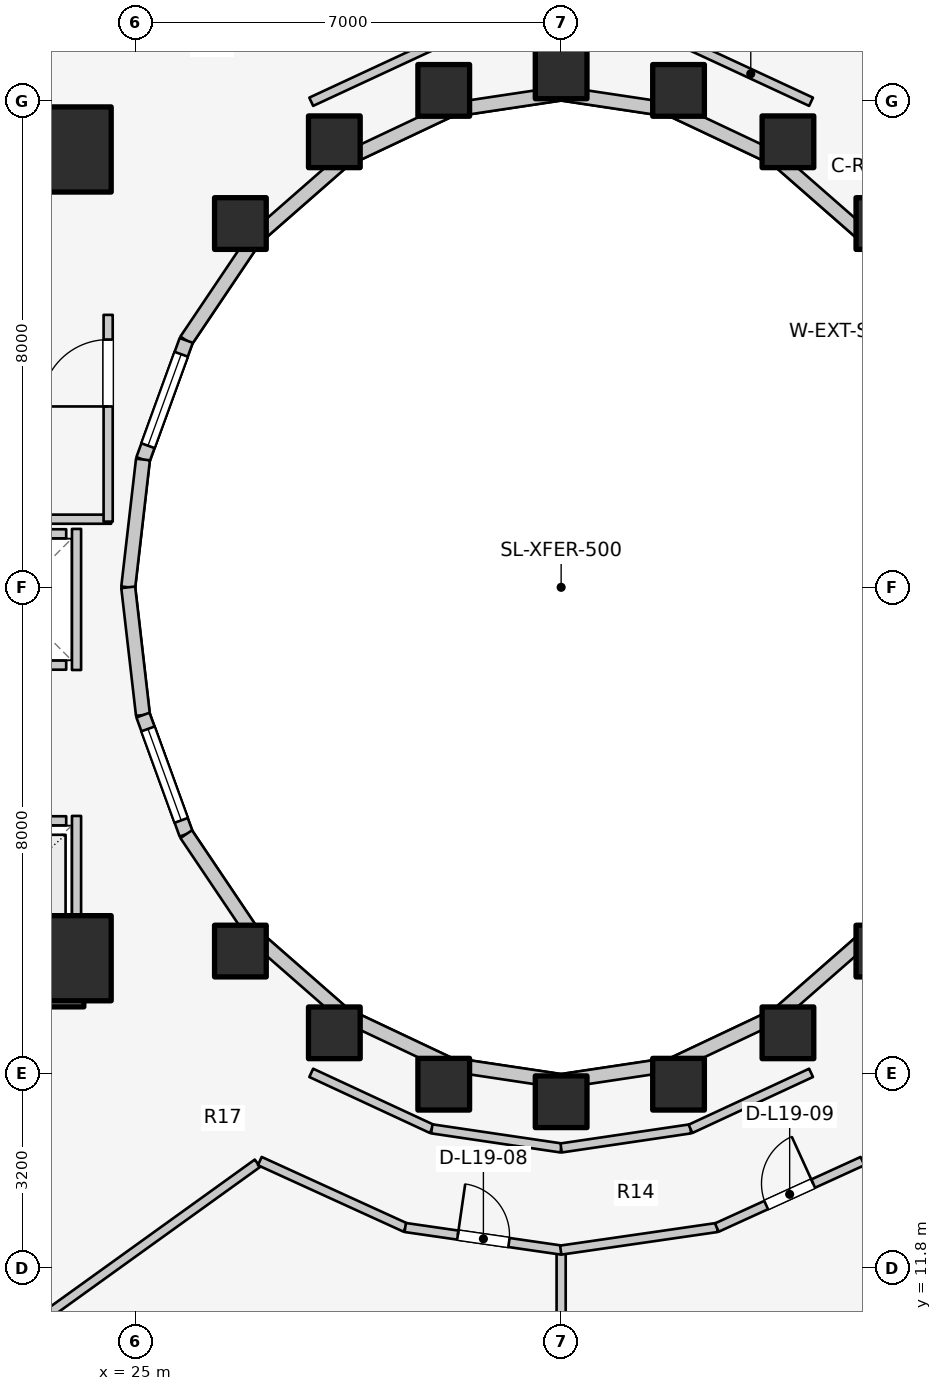
"""IFC4 building model, lengths in metres.
Left out: names, types, materials, properties, quantities, classifications, styles, units other than length and angle.
Written with IfcOpenShell. Run it as: python <this file> out.ifc"""

import sys

from ifc_helpers import new_model, si_unit, direction, frame, frame_2d, origin, origin_2d, place, context, subcontext, project, spatial, rectangle, extrude, element, fill, save


model = new_model("IFC4")
c1 = context("Model", 3, precision=1e-05, world=origin(), true_north=direction((0.0, 1.0)))
c2 = subcontext(c1, "Body", "Model", "MODEL_VIEW")
j1 = project(units=[si_unit("LENGTHUNIT", "METRE"), si_unit("PLANEANGLEUNIT", "RADIAN")], contexts=[c1])
p1 = place(None, origin())
s1 = spatial("IfcSite", under=j1, at=p1, CompositionType="ELEMENT")
p2 = place(p1, origin())
s2 = spatial("IfcBuilding", under=s1, at=p2, CompositionType="ELEMENT")
p3 = place(p2, frame((0.0, 0.0, 64.8)))
s3 = spatial("IfcBuildingStorey", under=s2, at=p3, CompositionType="ELEMENT", Elevation=64.8)
for number, where, z_axis, x_axis in (
    (1, (19.65, 16.55, 0.0), (0.0, 0.0, 1.0), (1.0, 0.0, 0.0)),
    (2, (19.65, 30.35, 0.0), (0.0, 0.0, 1.0), (1.0, 0.0, 0.0)),
):
    element("IfcWall", number, at=place(p3, frame(where, z_axis=z_axis, x_axis=x_axis)), inside=s3, PredefinedType="SHEAR", context=c2, shape_type="SweptSolid", body=[
        extrude(rectangle(XDim=4.5, YDim=0.9, at=frame_2d((2.25, 0.0))), origin(), (0.0, 0.0, 1.0), 4.2),
    ])
for number, where, z_axis, x_axis in (
    (3, (23.9, 16.9, 0.0), (0.0, 0.0, 1.0), (1.0, 0.0, 0.0)),
    (4, (23.9, 30.2, 0.0), (0.0, 0.0, 1.0), (1.0, 0.0, 0.0)),
):
    element("IfcColumn", number, at=place(p3, frame(where, z_axis=z_axis, x_axis=x_axis)), inside=s3, PredefinedType="COLUMN", context=c2, shape_type="SweptSolid", body=[
        extrude(rectangle(XDim=1.4, YDim=1.4, at=origin_2d()), origin(), (0.0, 0.0, 1.0), 4.2),
    ])
for number, where, z_axis, x_axis in (
    (5, (37.275, 28.982, 0.0), (0.0, 0.0, 1.0), (1.0, 0.0, 0.0)),
    (6, (35.73, 30.327, 0.0), (0.0, 0.0, 1.0), (1.0, 0.0, 0.0)),
    (7, (33.931, 31.172, 0.0), (0.0, 0.0, 1.0), (1.0, 0.0, 0.0)),
    (8, (32.0, 31.46, 0.0), (0.0, 0.0, 1.0), (1.0, 0.0, 0.0)),
    (9, (30.069, 31.172, 0.0), (0.0, 0.0, 1.0), (1.0, 0.0, 0.0)),
    (10, (28.27, 30.327, 0.0), (0.0, 0.0, 1.0), (1.0, 0.0, 0.0)),
    (11, (26.725, 28.982, 0.0), (0.0, 0.0, 1.0), (1.0, 0.0, 0.0)),
    (12, (26.725, 17.018, 0.0), (0.0, 0.0, 1.0), (1.0, 0.0, 0.0)),
    (13, (28.27, 15.673, 0.0), (0.0, 0.0, 1.0), (1.0, 0.0, 0.0)),
    (14, (30.069, 14.828, 0.0), (0.0, 0.0, 1.0), (1.0, 0.0, 0.0)),
    (15, (32.0, 14.54, 0.0), (0.0, 0.0, 1.0), (1.0, 0.0, 0.0)),
    (16, (33.931, 14.828, 0.0), (0.0, 0.0, 1.0), (1.0, 0.0, 0.0)),
    (17, (35.73, 15.673, 0.0), (0.0, 0.0, 1.0), (1.0, 0.0, 0.0)),
    (18, (37.275, 17.018, 0.0), (0.0, 0.0, 1.0), (1.0, 0.0, 0.0)),
):
    element("IfcColumn", number, at=place(p3, frame(where, z_axis=z_axis, x_axis=x_axis)), inside=s3, PredefinedType="COLUMN", context=c2, shape_type="SweptSolid", body=[
        extrude(rectangle(XDim=0.85, YDim=0.85, at=origin_2d()), origin(), (0.0, 0.0, 1.0), 4.2),
    ])
p4 = place(p3, frame((38.166, 27.06, 0.0), z_axis=(0.0, 0.0, 1.0), x_axis=(-0.558197800898, 0.829707909492, 0.0)))
e19 = element("IfcWall", 19, at=p4, inside=s3, PredefinedType="STANDARD", context=c2, shape_type="SweptSolid", body=[
    extrude(rectangle(XDim=2.027, YDim=0.23, at=frame_2d((1.013, 0.0))), origin(), (0.0, 0.0, 1.0), 2.32),
])
p5 = place(p3, frame((37.035, 28.742, 0.0), z_axis=(0.0, 0.0, 1.0), x_axis=(-0.752576694707, 0.658504607869, 0.0)))
e20 = element("IfcWall", 20, at=p5, inside=s3, PredefinedType="STANDARD", context=c2, shape_type="SweptSolid", body=[
    extrude(rectangle(XDim=1.959, YDim=0.23, at=frame_2d((0.98, 0.0))), origin(), (0.0, 0.0, 1.0), 2.32),
])
p6 = place(p3, frame((35.56, 30.032, 0.0), z_axis=(0.0, 0.0, 1.0), x_axis=(-0.904179699603, 0.427152280606, 0.0)))
e21 = element("IfcWall", 21, at=p6, inside=s3, PredefinedType="STANDARD", context=c2, shape_type="SweptSolid", body=[
    extrude(rectangle(XDim=1.899, YDim=0.23, at=frame_2d((0.95, 0.0))), origin(), (0.0, 0.0, 1.0), 2.32),
])
for number, where, z_axis, x_axis in (
    (22, (33.843, 30.843, 0.0), (0.0, 0.0, 1.0), (-0.989, 0.149, 0.0)),
    (23, (32.0, 31.12, 0.0), (0.0, 0.0, 1.0), (-0.989, -0.149, 0.0)),
):
    element("IfcWall", number, at=place(p3, frame(where, z_axis=z_axis, x_axis=x_axis)), inside=s3, PredefinedType="STANDARD", context=c2, shape_type="SweptSolid", body=[
        extrude(rectangle(XDim=1.864, YDim=0.23, at=frame_2d((0.932, 0.0))), origin(), (0.0, 0.0, 1.0), 2.32),
    ])
p7 = place(p3, frame((30.157, 30.843, 0.0), z_axis=(0.0, 0.0, 1.0), x_axis=(-0.904179699603, -0.427152280606, 0.0)))
e24 = element("IfcWall", 24, at=p7, inside=s3, PredefinedType="STANDARD", context=c2, shape_type="SweptSolid", body=[
    extrude(rectangle(XDim=1.899, YDim=0.23, at=frame_2d((0.95, 0.0))), origin(), (0.0, 0.0, 1.0), 2.32),
])
p8 = place(p3, frame((28.44, 30.032, 0.0), z_axis=(0.0, 0.0, 1.0), x_axis=(-0.752576694707, -0.658504607869, 0.0)))
e25 = element("IfcWall", 25, at=p8, inside=s3, PredefinedType="STANDARD", context=c2, shape_type="SweptSolid", body=[
    extrude(rectangle(XDim=1.959, YDim=0.23, at=frame_2d((0.98, 0.0))), origin(), (0.0, 0.0, 1.0), 2.32),
])
p9 = place(p3, frame((26.965, 28.742, 0.0), z_axis=(0.0, 0.0, 1.0), x_axis=(-0.558197800898, -0.829707909492, 0.0)))
e26 = element("IfcWall", 26, at=p9, inside=s3, PredefinedType="STANDARD", context=c2, shape_type="SweptSolid", body=[
    extrude(rectangle(XDim=2.027, YDim=0.23, at=frame_2d((1.013, 0.0))), origin(), (0.0, 0.0, 1.0), 2.32),
])
p10 = place(p3, frame((25.834, 27.06, 0.0), z_axis=(0.0, 0.0, 1.0), x_axis=(-0.341423187295, -0.93990968033, 0.0)))
e27 = element("IfcWall", 27, at=p10, inside=s3, PredefinedType="STANDARD", context=c2, shape_type="SweptSolid", body=[
    extrude(rectangle(XDim=2.084, YDim=0.23, at=frame_2d((1.042, 0.0))), origin(), (0.0, 0.0, 1.0), 2.8),
])
p11 = place(p10, frame((0.242, 0.0, 0.85)))
e28 = element("IfcOpeningElement", 28, at=p11, cuts=e27, PredefinedType="OPENING", context=c2, shape_type="SweptSolid", body=[
    extrude(rectangle(XDim=1.6, YDim=1.65, at=frame_2d((0.8, 0.825))), frame((0.0, 0.125, 0.0), z_axis=(0.0, -1.0, 0.0), x_axis=(1.0, 0.0, 0.0)), (0.0, 0.0, 1.0), 0.25),
])
for number, where, z_axis, x_axis in (
    (29, (25.123, 25.102, 0.0), (0.0, 0.0, 1.0), (-0.115, -0.993, 0.0)),
    (30, (24.88, 23.0, 0.0), (0.0, 0.0, 1.0), (0.115, -0.993, 0.0)),
):
    element("IfcWall", number, at=place(p3, frame(where, z_axis=z_axis, x_axis=x_axis)), inside=s3, PredefinedType="STANDARD", context=c2, shape_type="SweptSolid", body=[
        extrude(rectangle(XDim=2.115, YDim=0.23, at=frame_2d((1.058, 0.0))), origin(), (0.0, 0.0, 1.0), 2.8),
    ])
p12 = place(p3, frame((25.123, 20.898, 0.0), z_axis=(0.0, 0.0, 1.0), x_axis=(0.341423187295, -0.93990968033, 0.0)))
e31 = element("IfcWall", 31, at=p12, inside=s3, PredefinedType="STANDARD", context=c2, shape_type="SweptSolid", body=[
    extrude(rectangle(XDim=2.084, YDim=0.23, at=frame_2d((1.042, 0.0))), origin(), (0.0, 0.0, 1.0), 2.8),
])
p13 = place(p12, frame((0.242, 0.0, 0.85)))
e32 = element("IfcOpeningElement", 32, at=p13, cuts=e31, PredefinedType="OPENING", context=c2, shape_type="SweptSolid", body=[
    extrude(rectangle(XDim=1.6, YDim=1.65, at=frame_2d((0.8, 0.825))), frame((0.0, 0.125, 0.0), z_axis=(0.0, -1.0, 0.0), x_axis=(1.0, 0.0, 0.0)), (0.0, 0.0, 1.0), 0.25),
])
p14 = place(p3, frame((25.834, 18.94, 0.0), z_axis=(0.0, 0.0, 1.0), x_axis=(0.558197800898, -0.829707909492, 0.0)))
e33 = element("IfcWall", 33, at=p14, inside=s3, PredefinedType="STANDARD", context=c2, shape_type="SweptSolid", body=[
    extrude(rectangle(XDim=2.027, YDim=0.23, at=frame_2d((1.013, 0.0))), origin(), (0.0, 0.0, 1.0), 2.32),
])
p15 = place(p3, frame((26.965, 17.258, 0.0), z_axis=(0.0, 0.0, 1.0), x_axis=(0.752576694707, -0.658504607869, 0.0)))
e34 = element("IfcWall", 34, at=p15, inside=s3, PredefinedType="STANDARD", context=c2, shape_type="SweptSolid", body=[
    extrude(rectangle(XDim=1.959, YDim=0.23, at=frame_2d((0.98, 0.0))), origin(), (0.0, 0.0, 1.0), 2.32),
])
p16 = place(p3, frame((28.44, 15.968, 0.0), z_axis=(0.0, 0.0, 1.0), x_axis=(0.904179699603, -0.427152280606, 0.0)))
e35 = element("IfcWall", 35, at=p16, inside=s3, PredefinedType="STANDARD", context=c2, shape_type="SweptSolid", body=[
    extrude(rectangle(XDim=1.899, YDim=0.23, at=frame_2d((0.95, 0.0))), origin(), (0.0, 0.0, 1.0), 2.32),
])
for number, where, z_axis, x_axis in (
    (36, (30.157, 15.157, 0.0), (0.0, 0.0, 1.0), (0.989, -0.149, 0.0)),
    (37, (32.0, 14.88, 0.0), (0.0, 0.0, 1.0), (0.989, 0.149, 0.0)),
):
    element("IfcWall", number, at=place(p3, frame(where, z_axis=z_axis, x_axis=x_axis)), inside=s3, PredefinedType="STANDARD", context=c2, shape_type="SweptSolid", body=[
        extrude(rectangle(XDim=1.864, YDim=0.23, at=frame_2d((0.932, 0.0))), origin(), (0.0, 0.0, 1.0), 2.32),
    ])
p17 = place(p3, frame((33.843, 15.157, 0.0), z_axis=(0.0, 0.0, 1.0), x_axis=(0.904179699603, 0.427152280606, 0.0)))
e38 = element("IfcWall", 38, at=p17, inside=s3, PredefinedType="STANDARD", context=c2, shape_type="SweptSolid", body=[
    extrude(rectangle(XDim=1.899, YDim=0.23, at=frame_2d((0.95, 0.0))), origin(), (0.0, 0.0, 1.0), 2.32),
])
p18 = place(p3, frame((35.56, 15.968, 0.0), z_axis=(0.0, 0.0, 1.0), x_axis=(0.752576694707, 0.658504607869, 0.0)))
e39 = element("IfcWall", 39, at=p18, inside=s3, PredefinedType="STANDARD", context=c2, shape_type="SweptSolid", body=[
    extrude(rectangle(XDim=1.959, YDim=0.23, at=frame_2d((0.98, 0.0))), origin(), (0.0, 0.0, 1.0), 2.32),
])
p19 = place(p3, frame((37.035, 17.258, 0.0), z_axis=(0.0, 0.0, 1.0), x_axis=(0.558197800898, 0.829707909492, 0.0)))
e40 = element("IfcWall", 40, at=p19, inside=s3, PredefinedType="STANDARD", context=c2, shape_type="SweptSolid", body=[
    extrude(rectangle(XDim=2.027, YDim=0.23, at=frame_2d((1.013, 0.0))), origin(), (0.0, 0.0, 1.0), 2.32),
])
p20 = place(p3, frame((22.04, 19.16, 0.0), z_axis=(0.0, 0.0, 1.0), x_axis=(1.0, 0.0, 0.0)))
e41 = element("IfcWall", 41, at=p20, inside=s3, PredefinedType="SOLIDWALL", context=c2, shape_type="SweptSolid", body=[
    extrude(rectangle(XDim=1.82, YDim=0.15, at=frame_2d((0.91, 0.0))), origin(), (0.0, 0.0, 1.0), 3.22),
])
p21 = place(p20, frame((0.36, 0.0, 0.0)))
e42 = element("IfcOpeningElement", 42, at=p21, cuts=e41, PredefinedType="OPENING", context=c2, shape_type="SweptSolid", body=[
    extrude(rectangle(XDim=1.1, YDim=2.1, at=frame_2d((0.55, 1.05))), frame((0.0, 0.085, 0.0), z_axis=(0.0, -1.0, 0.0), x_axis=(1.0, 0.0, 0.0)), (0.0, 0.0, 1.0), 0.17),
])
p22 = place(p3, frame((22.04, 17.1, 0.0), z_axis=(0.0, 0.0, 1.0), x_axis=(1.0, 0.0, 0.0)))
e43 = element("IfcWall", 43, at=p22, inside=s3, PredefinedType="SOLIDWALL", context=c2, shape_type="SweptSolid", body=[
    extrude(rectangle(XDim=1.82, YDim=0.15, at=frame_2d((0.91, 0.0))), origin(), (0.0, 0.0, 1.0), 3.22),
])
p23 = place(p3, frame((24.03, 17.02, 0.0), z_axis=(0.0, 0.0, 1.0), x_axis=(0.0, 1.0, 0.0)))
e44 = element("IfcWall", 44, at=p23, inside=s3, PredefinedType="SOLIDWALL", context=c2, shape_type="SweptSolid", body=[
    extrude(rectangle(XDim=2.22, YDim=0.15, at=frame_2d((1.11, 0.0))), origin(), (0.0, 0.0, 1.0), 2.973),
])
for number, where, z_axis, x_axis in (
    (45, (22.04, 21.72, 0.0), (0.0, 0.0, 1.0), (1.0, 0.0, 0.0)),
    (46, (22.04, 23.88, 0.0), (0.0, 0.0, 1.0), (1.0, 0.0, 0.0)),
):
    element("IfcWall", number, at=place(p3, frame(where, z_axis=z_axis, x_axis=x_axis)), inside=s3, PredefinedType="SOLIDWALL", context=c2, shape_type="SweptSolid", body=[
        extrude(rectangle(XDim=1.82, YDim=0.15, at=frame_2d((0.91, 0.0))), origin(), (0.0, 0.0, 1.0), 3.22),
    ])
p24 = place(p3, frame((24.03, 21.64, 0.0), z_axis=(0.0, 0.0, 1.0), x_axis=(0.0, 1.0, 0.0)))
e47 = element("IfcWall", 47, at=p24, inside=s3, PredefinedType="SOLIDWALL", context=c2, shape_type="SweptSolid", body=[
    extrude(rectangle(XDim=2.32, YDim=0.15, at=frame_2d((1.16, 0.0))), origin(), (0.0, 0.0, 1.0), 3.22),
])
p25 = place(p3, frame((19.52, 24.12, 0.0), z_axis=(0.0, 0.0, 1.0), x_axis=(1.0, 0.0, 0.0)))
e48 = element("IfcWall", 48, at=p25, inside=s3, PredefinedType="PARTITIONING", context=c2, shape_type="SweptSolid", body=[
    extrude(rectangle(XDim=5.08, YDim=0.15, at=frame_2d((2.54, 0.0))), origin(), (0.0, 0.0, 1.0), 3.22),
])
p26 = place(p3, frame((24.55, 24.08, 0.0), z_axis=(0.0, 0.0, 1.0), x_axis=(0.0, 1.0, 0.0)))
e49 = element("IfcWall", 49, at=p26, inside=s3, PredefinedType="PARTITIONING", context=c2, shape_type="SweptSolid", body=[
    extrude(rectangle(XDim=3.4, YDim=0.15, at=frame_2d((1.7, 0.0))), origin(), (0.0, 0.0, 1.0), 3.675),
])
p27 = place(p26, frame((1.894, 0.0, 0.0)))
e50 = element("IfcOpeningElement", 50, at=p27, cuts=e49, PredefinedType="OPENING", context=c2, shape_type="SweptSolid", body=[
    extrude(rectangle(XDim=1.1, YDim=2.1, at=frame_2d((0.55, 1.05))), frame((0.0, 0.085, 0.0), z_axis=(0.0, -1.0, 0.0), x_axis=(1.0, 0.0, 0.0)), (0.0, 0.0, 1.0), 0.17),
])
for number, where, z_axis, x_axis in (
    (51, (36.11, 30.985, 0.0), (0.0, 0.0, 1.0), (-0.907, 0.421, 0.0)),
    (52, (29.873, 31.906, 0.0), (0.0, 0.0, 1.0), (-0.907, -0.421, 0.0)),
    (53, (27.89, 15.015, 0.0), (0.0, 0.0, 1.0), (0.907, -0.421, 0.0)),
):
    element("IfcWall", number, at=place(p3, frame(where, z_axis=z_axis, x_axis=x_axis)), inside=s3, PredefinedType="PARTITIONING", context=c2, shape_type="SweptSolid", body=[
        extrude(rectangle(XDim=2.186, YDim=0.15, at=frame_2d((1.093, 0.0))), origin(), (0.0, 0.0, 1.0), 2.32),
    ])
for number, where, z_axis, x_axis in (
    (54, (29.873, 14.094, 0.0), (0.0, 0.0, 1.0), (0.989, -0.146, 0.0)),
    (55, (32.0, 13.78, 0.0), (0.0, 0.0, 1.0), (0.989, 0.146, 0.0)),
):
    element("IfcWall", number, at=place(p3, frame(where, z_axis=z_axis, x_axis=x_axis)), inside=s3, PredefinedType="PARTITIONING", context=c2, shape_type="SweptSolid", body=[
        extrude(rectangle(XDim=2.151, YDim=0.15, at=frame_2d((1.075, 0.0))), origin(), (0.0, 0.0, 1.0), 3.092),
    ])
p28 = place(p3, frame((34.127, 14.094, 0.0), z_axis=(0.0, 0.0, 1.0), x_axis=(0.906943449489, 0.421252393975, 0.0)))
e56 = element("IfcWall", 56, at=p28, inside=s3, PredefinedType="PARTITIONING", context=c2, shape_type="SweptSolid", body=[
    extrude(rectangle(XDim=2.186, YDim=0.15, at=frame_2d((1.093, 0.0))), origin(), (0.0, 0.0, 1.0), 2.32),
])
p29 = place(p3, frame((27.005, 13.528, 0.0), z_axis=(0.0, 0.0, 1.0), x_axis=(-0.811691742112, -0.584086051697, 0.0)))
e57 = element("IfcWall", 57, at=p29, inside=s3, PredefinedType="PARTITIONING", context=c2, shape_type="SweptSolid", body=[
    extrude(rectangle(XDim=9.824, YDim=0.15, at=frame_2d((4.912, 0.0))), origin(), (0.0, 0.0, 1.0), 2.32),
])
p30 = place(p3, frame((32.0, 12.045, 0.0), z_axis=(0.0, 0.0, 1.0), x_axis=(0.0, -1.0, 0.0)))
e58 = element("IfcWall", 58, at=p30, inside=s3, PredefinedType="PARTITIONING", context=c2, shape_type="SweptSolid", body=[
    extrude(rectangle(XDim=7.02, YDim=0.15, at=frame_2d((3.51, 0.0))), origin(), (0.0, 0.0, 1.0), 2.32),
])
p31 = place(p3, frame((27.044, 13.564, 0.0), z_axis=(0.0, 0.0, 1.0), x_axis=(0.909736731002, -0.415185597373, 0.0)))
e59 = element("IfcWall", 59, at=p31, inside=s3, PredefinedType="PARTITIONING", context=c2, shape_type="SweptSolid", body=[
    extrude(rectangle(XDim=2.633, YDim=0.15, at=frame_2d((1.317, 0.0))), origin(), (0.0, 0.0, 1.0), 3.092),
])
p32 = place(p3, frame((29.436, 12.472, 0.0), z_axis=(0.0, 0.0, 1.0), x_axis=(0.989701742337, -0.143144895876, 0.0)))
e60 = element("IfcWall", 60, at=p32, inside=s3, PredefinedType="PARTITIONING", context=c2, shape_type="SweptSolid", body=[
    extrude(rectangle(XDim=2.598, YDim=0.15, at=frame_2d((1.299, 0.0))), origin(), (0.0, 0.0, 1.0), 3.092),
])
p33 = place(p32, frame((0.874, 0.0, 0.0)))
e61 = element("IfcOpeningElement", 61, at=p33, cuts=e60, PredefinedType="OPENING", context=c2, shape_type="SweptSolid", body=[
    extrude(rectangle(XDim=0.85, YDim=2.05, at=frame_2d((0.425, 1.025))), frame((0.0, 0.085, 0.0), z_axis=(0.0, -1.0, 0.0), x_axis=(1.0, 0.0, 0.0)), (0.0, 0.0, 1.0), 0.17),
])
p34 = place(p3, frame((31.993, 12.1, 0.0), z_axis=(0.0, 0.0, 1.0), x_axis=(0.989701742337, 0.143144895876, 0.0)))
e62 = element("IfcWall", 62, at=p34, inside=s3, PredefinedType="PARTITIONING", context=c2, shape_type="SweptSolid", body=[
    extrude(rectangle(XDim=2.598, YDim=0.15, at=frame_2d((1.299, 0.0))), origin(), (0.0, 0.0, 1.0), 3.092),
])
p35 = place(p3, frame((34.561, 12.471, 0.0), z_axis=(0.0, 0.0, 1.0), x_axis=(0.909736731002, 0.415185597373, 0.0)))
e63 = element("IfcWall", 63, at=p35, inside=s3, PredefinedType="PARTITIONING", context=c2, shape_type="SweptSolid", body=[
    extrude(rectangle(XDim=2.633, YDim=0.15, at=frame_2d((1.317, 0.0))), origin(), (0.0, 0.0, 1.0), 3.092),
])
p36 = place(p35, frame((0.892, 0.0, 0.0)))
e64 = element("IfcOpeningElement", 64, at=p36, cuts=e63, PredefinedType="OPENING", context=c2, shape_type="SweptSolid", body=[
    extrude(rectangle(XDim=0.85, YDim=2.05, at=frame_2d((0.425, 1.025))), frame((0.0, 0.085, 0.0), z_axis=(0.0, -1.0, 0.0), x_axis=(1.0, 0.0, 0.0)), (0.0, 0.0, 1.0), 0.17),
])
p37 = place(p11, origin())
e65 = element("IfcWindow", 65, at=p37, inside=s3, PartitioningType="SINGLE_PANEL", PredefinedType="WINDOW", context=c2, shape_type="SweptSolid", body=[
    extrude(rectangle(XDim=1.6, YDim=1.65, at=frame_2d((0.8, 0.825))), frame((0.0, 0.03, 0.0), z_axis=(0.0, -1.0, 0.0), x_axis=(1.0, 0.0, 0.0)), (0.0, 0.0, 1.0), 0.06),
])
fill(e28, e65)
p38 = place(p13, origin())
e66 = element("IfcWindow", 66, at=p38, inside=s3, PartitioningType="SINGLE_PANEL", PredefinedType="WINDOW", context=c2, shape_type="SweptSolid", body=[
    extrude(rectangle(XDim=1.6, YDim=1.65, at=frame_2d((0.8, 0.825))), frame((0.0, 0.03, 0.0), z_axis=(0.0, -1.0, 0.0), x_axis=(1.0, 0.0, 0.0)), (0.0, 0.0, 1.0), 0.06),
])
fill(e32, e66)
p39 = place(p27, origin())
e67 = element("IfcDoor", 67, at=p39, inside=s3, OperationType="SINGLE_SWING_LEFT", PredefinedType="DOOR", context=c2, shape_type="SweptSolid", body=[
    extrude(rectangle(XDim=1.1, YDim=2.1, at=frame_2d((0.55, 1.05))), frame((0.0, 0.025, 0.0), z_axis=(0.0, -1.0, 0.0), x_axis=(1.0, 0.0, 0.0)), (0.0, 0.0, 1.0), 0.05),
])
fill(e50, e67)
p40 = place(p33, origin())
e68 = element("IfcDoor", 68, at=p40, inside=s3, OperationType="SINGLE_SWING_LEFT", PredefinedType="DOOR", context=c2, shape_type="SweptSolid", body=[
    extrude(rectangle(XDim=0.85, YDim=2.05, at=frame_2d((0.425, 1.025))), frame((0.0, 0.025, 0.0), z_axis=(0.0, -1.0, 0.0), x_axis=(1.0, 0.0, 0.0)), (0.0, 0.0, 1.0), 0.05),
])
fill(e61, e68)
p41 = place(p36, origin())
e69 = element("IfcDoor", 69, at=p41, inside=s3, OperationType="SINGLE_SWING_RIGHT", PredefinedType="DOOR", context=c2, shape_type="SweptSolid", body=[
    extrude(rectangle(XDim=0.85, YDim=2.05, at=frame_2d((0.425, 1.025))), frame((0.0, 0.025, 0.0), z_axis=(0.0, -1.0, 0.0), x_axis=(1.0, 0.0, 0.0)), (0.0, 0.0, 1.0), 0.05),
])
fill(e64, e69)
save(model, sys.argv[1])
